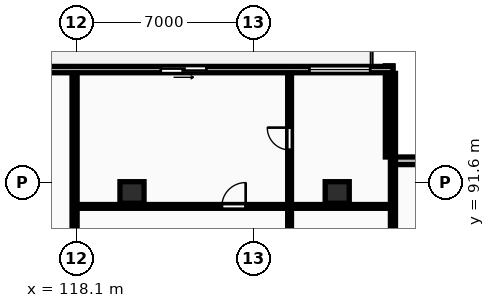
"""IFC4 building model, lengths in metres.
Left out: names, types, materials, properties, quantities, classifications, styles, units other than length and angle.
Written with IfcOpenShell. Run it as: python <this file> out.ifc"""

import sys

from ifc_helpers import new_model, si_unit, direction, frame, frame_2d, origin, origin_2d, place, context, subcontext, project, spatial, rectangle, extrude, element, fill, save


model = new_model("IFC4")
c1 = context("Model", 3, precision=1e-05, world=origin(), true_north=direction((0.0, 1.0)))
c2 = subcontext(c1, "Body", "Model", "MODEL_VIEW")
j1 = project(units=[si_unit("LENGTHUNIT", "METRE"), si_unit("PLANEANGLEUNIT", "RADIAN")], contexts=[c1])
p1 = place(None, origin())
s1 = spatial("IfcSite", under=j1, at=p1, CompositionType="ELEMENT")
p2 = place(p1, origin())
s2 = spatial("IfcBuilding", under=s1, at=p2, CompositionType="ELEMENT")
p3 = place(p2, frame((0.0, 0.0, 87.3)))
s3 = spatial("IfcBuildingStorey", under=s2, at=p3, CompositionType="ELEMENT", Elevation=87.3)
for number, where, z_axis, x_axis in (
    (1, (120.3, 91.2, 0.0), (0.0, 0.0, 1.0), (1.0, 0.0, 0.0)),
    (2, (128.4, 91.2, 0.0), (0.0, 0.0, 1.0), (1.0, 0.0, 0.0)),
):
    element("IfcColumn", number, at=place(p3, frame(where, z_axis=z_axis, x_axis=x_axis)), inside=s3, PredefinedType="COLUMN", context=c2, shape_type="SweptSolid", body=[
        extrude(rectangle(XDim=0.95, YDim=0.85, at=origin_2d()), origin(), (0.0, 0.0, 1.0), 3.25),
    ])
for number, where, z_axis, x_axis in (
    (3, (134.2, 92.45, 0.0), (0.0, 0.0, 1.0), (-1.0, 0.0, 0.0)),
    (4, (130.45, 92.6, 0.0), (0.0, 0.0, 1.0), (0.0, 1.0, 0.0)),
):
    element("IfcWall", number, at=place(p3, frame(where, z_axis=z_axis, x_axis=x_axis)), inside=s3, PredefinedType="STANDARD", context=c2, shape_type="SweptSolid", body=[
        extrude(rectangle(XDim=3.6, YDim=0.3, at=frame_2d((1.8, 0.0))), origin(), (0.0, 0.0, 1.0), 2.97),
    ])
p4 = place(p3, frame((130.6, 96.05, 0.0), z_axis=(0.0, 0.0, 1.0), x_axis=(-1.0, 0.0, 0.0)))
e5 = element("IfcWall", 5, at=p4, inside=s3, PredefinedType="STANDARD", context=c2, shape_type="SweptSolid", body=[
    extrude(rectangle(XDim=73.0, YDim=0.25, at=frame_2d((36.5, 0.0))), origin(), (0.0, 0.0, 1.0), 2.97),
])
p5 = place(p4, frame((67.867, 0.0, 0.0)))
e6 = element("IfcOpeningElement", 6, at=p5, cuts=e5, PredefinedType="OPENING", context=c2, shape_type="SweptSolid", body=[
    extrude(rectangle(XDim=1.8, YDim=2.2, at=frame_2d((0.9, 1.1))), frame((0.0, 0.135, 0.0), z_axis=(0.0, -1.0, 0.0), x_axis=(1.0, 0.0, 0.0)), (0.0, 0.0, 1.0), 0.27),
])
p6 = place(p4, frame((62.103, 0.0, 0.85)))
e7 = element("IfcOpeningElement", 7, at=p6, cuts=e5, PredefinedType="OPENING", context=c2, shape_type="SweptSolid", body=[
    extrude(rectangle(XDim=1.8, YDim=1.8, at=frame_2d((0.9, 0.9))), frame((0.0, 0.135, 0.0), z_axis=(0.0, -1.0, 0.0), x_axis=(1.0, 0.0, 0.0)), (0.0, 0.0, 1.0), 0.27),
])
p7 = place(p4, frame((56.196, 0.0, 0.0)))
e8 = element("IfcOpeningElement", 8, at=p7, cuts=e5, PredefinedType="OPENING", context=c2, shape_type="SweptSolid", body=[
    extrude(rectangle(XDim=1.8, YDim=2.2, at=frame_2d((0.9, 1.1))), frame((0.0, 0.135, 0.0), z_axis=(0.0, -1.0, 0.0), x_axis=(1.0, 0.0, 0.0)), (0.0, 0.0, 1.0), 0.27),
])
p8 = place(p4, frame((46.557, 0.0, 0.85)))
e9 = element("IfcOpeningElement", 9, at=p8, cuts=e5, PredefinedType="OPENING", context=c2, shape_type="SweptSolid", body=[
    extrude(rectangle(XDim=2.4, YDim=1.9, at=frame_2d((1.2, 0.95))), frame((0.0, 0.135, 0.0), z_axis=(0.0, -1.0, 0.0), x_axis=(1.0, 0.0, 0.0)), (0.0, 0.0, 1.0), 0.27),
])
p9 = place(p4, frame((36.714, 0.0, 0.0)))
e10 = element("IfcOpeningElement", 10, at=p9, cuts=e5, PredefinedType="OPENING", context=c2, shape_type="SweptSolid", body=[
    extrude(rectangle(XDim=1.8, YDim=2.2, at=frame_2d((0.9, 1.1))), frame((0.0, 0.135, 0.0), z_axis=(0.0, -1.0, 0.0), x_axis=(1.0, 0.0, 0.0)), (0.0, 0.0, 1.0), 0.27),
])
p10 = place(p4, frame((30.483, 0.0, 0.85)))
e11 = element("IfcOpeningElement", 11, at=p10, cuts=e5, PredefinedType="OPENING", context=c2, shape_type="SweptSolid", body=[
    extrude(rectangle(XDim=1.8, YDim=1.8, at=frame_2d((0.9, 0.9))), frame((0.0, 0.135, 0.0), z_axis=(0.0, -1.0, 0.0), x_axis=(1.0, 0.0, 0.0)), (0.0, 0.0, 1.0), 0.27),
])
p11 = place(p4, frame((21.29, 0.0, 0.85)))
e12 = element("IfcOpeningElement", 12, at=p11, cuts=e5, PredefinedType="OPENING", context=c2, shape_type="SweptSolid", body=[
    extrude(rectangle(XDim=2.4, YDim=1.9, at=frame_2d((1.2, 0.95))), frame((0.0, 0.135, 0.0), z_axis=(0.0, -1.0, 0.0), x_axis=(1.0, 0.0, 0.0)), (0.0, 0.0, 1.0), 0.27),
])
p12 = place(p4, frame((17.593, 0.0, 0.85)))
e13 = element("IfcOpeningElement", 13, at=p12, cuts=e5, PredefinedType="OPENING", context=c2, shape_type="SweptSolid", body=[
    extrude(rectangle(XDim=1.8, YDim=1.8, at=frame_2d((0.9, 0.9))), frame((0.0, 0.135, 0.0), z_axis=(0.0, -1.0, 0.0), x_axis=(1.0, 0.0, 0.0)), (0.0, 0.0, 1.0), 0.27),
])
p13 = place(p4, frame((26.153, 0.0, 0.0)))
e14 = element("IfcOpeningElement", 14, at=p13, cuts=e5, PredefinedType="OPENING", context=c2, shape_type="SweptSolid", body=[
    extrude(rectangle(XDim=1.8, YDim=2.2, at=frame_2d((0.9, 1.1))), frame((0.0, 0.135, 0.0), z_axis=(0.0, -1.0, 0.0), x_axis=(1.0, 0.0, 0.0)), (0.0, 0.0, 1.0), 0.27),
])
p14 = place(p4, frame((13.753, 0.0, 0.85)))
e15 = element("IfcOpeningElement", 15, at=p14, cuts=e5, PredefinedType="OPENING", context=c2, shape_type="SweptSolid", body=[
    extrude(rectangle(XDim=1.8, YDim=1.8, at=frame_2d((0.9, 0.9))), frame((0.0, 0.135, 0.0), z_axis=(0.0, -1.0, 0.0), x_axis=(1.0, 0.0, 0.0)), (0.0, 0.0, 1.0), 0.27),
])
p15 = place(p4, frame((7.363, 0.0, 0.0)))
e16 = element("IfcOpeningElement", 16, at=p15, cuts=e5, PredefinedType="OPENING", context=c2, shape_type="SweptSolid", body=[
    extrude(rectangle(XDim=1.8, YDim=2.2, at=frame_2d((0.9, 1.1))), frame((0.0, 0.135, 0.0), z_axis=(0.0, -1.0, 0.0), x_axis=(1.0, 0.0, 0.0)), (0.0, 0.0, 1.0), 0.27),
])
p16 = place(p4, frame((0.9, 0.0, 0.85)))
e17 = element("IfcOpeningElement", 17, at=p16, cuts=e5, PredefinedType="OPENING", context=c2, shape_type="SweptSolid", body=[
    extrude(rectangle(XDim=2.4, YDim=1.9, at=frame_2d((1.2, 0.95))), frame((0.0, 0.135, 0.0), z_axis=(0.0, -1.0, 0.0), x_axis=(1.0, 0.0, 0.0)), (0.0, 0.0, 1.0), 0.27),
])
for number, where, z_axis, x_axis in (
    (18, (130.6, 69.43, 0.0), (0.0, 0.0, 1.0), (0.0, 1.0, 0.0)),
    (19, (118.033, 69.43, 0.0), (0.0, 0.0, 1.0), (0.0, 1.0, 0.0)),
):
    element("IfcWall", number, at=place(p3, frame(where, z_axis=z_axis, x_axis=x_axis)), inside=s3, PredefinedType="PARTITIONING", context=c2, shape_type="SweptSolid", body=[
        extrude(rectangle(XDim=26.47, YDim=0.2, at=frame_2d((13.235, 0.0))), origin(), (0.0, 0.0, 1.0), 2.97),
    ])
p17 = place(p3, frame((126.52, 85.59, 0.0), z_axis=(0.0, 0.0, 1.0), x_axis=(0.0, 1.0, 0.0)))
e20 = element("IfcWall", 20, at=p17, inside=s3, PredefinedType="PARTITIONING", context=c2, shape_type="SweptSolid", body=[
    extrude(rectangle(XDim=10.31, YDim=0.15, at=frame_2d((5.155, 0.0))), origin(), (0.0, 0.0, 1.0), 2.97),
])
p18 = place(p17, frame((1.43, 0.0, 0.0)))
e21 = element("IfcOpeningElement", 21, at=p18, cuts=e20, PredefinedType="OPENING", context=c2, shape_type="SweptSolid", body=[
    extrude(rectangle(XDim=0.84, YDim=2.04, at=frame_2d((0.42, 1.02))), frame((0.0, 0.085, 0.0), z_axis=(0.0, -1.0, 0.0), x_axis=(1.0, 0.0, 0.0)), (0.0, 0.0, 1.0), 0.17),
])
p19 = place(p17, frame((3.102, 0.0, 0.0)))
e22 = element("IfcOpeningElement", 22, at=p19, cuts=e20, PredefinedType="OPENING", context=c2, shape_type="SweptSolid", body=[
    extrude(rectangle(XDim=0.84, YDim=2.04, at=frame_2d((0.42, 1.02))), frame((0.0, 0.085, 0.0), z_axis=(0.0, -1.0, 0.0), x_axis=(1.0, 0.0, 0.0)), (0.0, 0.0, 1.0), 0.17),
])
p20 = place(p17, frame((7.29, 0.0, 0.0)))
e23 = element("IfcOpeningElement", 23, at=p20, cuts=e20, PredefinedType="OPENING", context=c2, shape_type="SweptSolid", body=[
    extrude(rectangle(XDim=0.88, YDim=2.06, at=frame_2d((0.44, 1.03))), frame((0.0, 0.085, 0.0), z_axis=(0.0, -1.0, 0.0), x_axis=(1.0, 0.0, 0.0)), (0.0, 0.0, 1.0), 0.17),
])
p21 = place(p3, frame((118.113, 90.65, 0.0), z_axis=(0.0, 0.0, 1.0), x_axis=(1.0, 0.0, 0.0)))
e24 = element("IfcWall", 24, at=p21, inside=s3, PredefinedType="PARTITIONING", context=c2, shape_type="SweptSolid", body=[
    extrude(rectangle(XDim=12.407, YDim=0.15, at=frame_2d((6.203, 0.0))), origin(), (0.0, 0.0, 1.0), 2.97),
])
p22 = place(p21, frame((5.733, 0.0, 0.0)))
e25 = element("IfcOpeningElement", 25, at=p22, cuts=e24, PredefinedType="OPENING", context=c2, shape_type="SweptSolid", body=[
    extrude(rectangle(XDim=0.94, YDim=2.1, at=frame_2d((0.47, 1.05))), frame((0.0, 0.085, 0.0), z_axis=(0.0, -1.0, 0.0), x_axis=(1.0, 0.0, 0.0)), (0.0, 0.0, 1.0), 0.17),
])
p23 = place(p15, origin())
e26 = element("IfcDoor", 26, at=p23, inside=s3, OperationType="SLIDING_TO_LEFT", PredefinedType="DOOR", context=c2, shape_type="SweptSolid", body=[
    extrude(rectangle(XDim=1.8, YDim=2.2, at=frame_2d((0.9, 1.1))), frame((0.0, 0.025, 0.0), z_axis=(0.0, -1.0, 0.0), x_axis=(1.0, 0.0, 0.0)), (0.0, 0.0, 1.0), 0.05),
])
fill(e16, e26)
p24 = place(p16, origin())
e27 = element("IfcWindow", 27, at=p24, inside=s3, PartitioningType="DOUBLE_PANEL_VERTICAL", PredefinedType="WINDOW", context=c2, shape_type="SweptSolid", body=[
    extrude(rectangle(XDim=2.4, YDim=1.9, at=frame_2d((1.2, 0.95))), frame((0.0, 0.03, 0.0), z_axis=(0.0, -1.0, 0.0), x_axis=(1.0, 0.0, 0.0)), (0.0, 0.0, 1.0), 0.06),
])
fill(e17, e27)
p25 = place(p20, origin())
e28 = element("IfcDoor", 28, at=p25, inside=s3, OperationType="SINGLE_SWING_RIGHT", PredefinedType="DOOR", context=c2, shape_type="SweptSolid", body=[
    extrude(rectangle(XDim=0.88, YDim=2.06, at=frame_2d((0.44, 1.03))), frame((0.0, 0.025, 0.0), z_axis=(0.0, -1.0, 0.0), x_axis=(1.0, 0.0, 0.0)), (0.0, 0.0, 1.0), 0.05),
])
fill(e23, e28)
p26 = place(p22, origin())
e29 = element("IfcDoor", 29, at=p26, inside=s3, OperationType="SINGLE_SWING_RIGHT", PredefinedType="DOOR", context=c2, shape_type="SweptSolid", body=[
    extrude(rectangle(XDim=0.94, YDim=2.1, at=frame_2d((0.47, 1.05))), frame((0.0, 0.025, 0.0), z_axis=(0.0, -1.0, 0.0), x_axis=(1.0, 0.0, 0.0)), (0.0, 0.0, 1.0), 0.05),
])
fill(e25, e29)
save(model, sys.argv[1])
